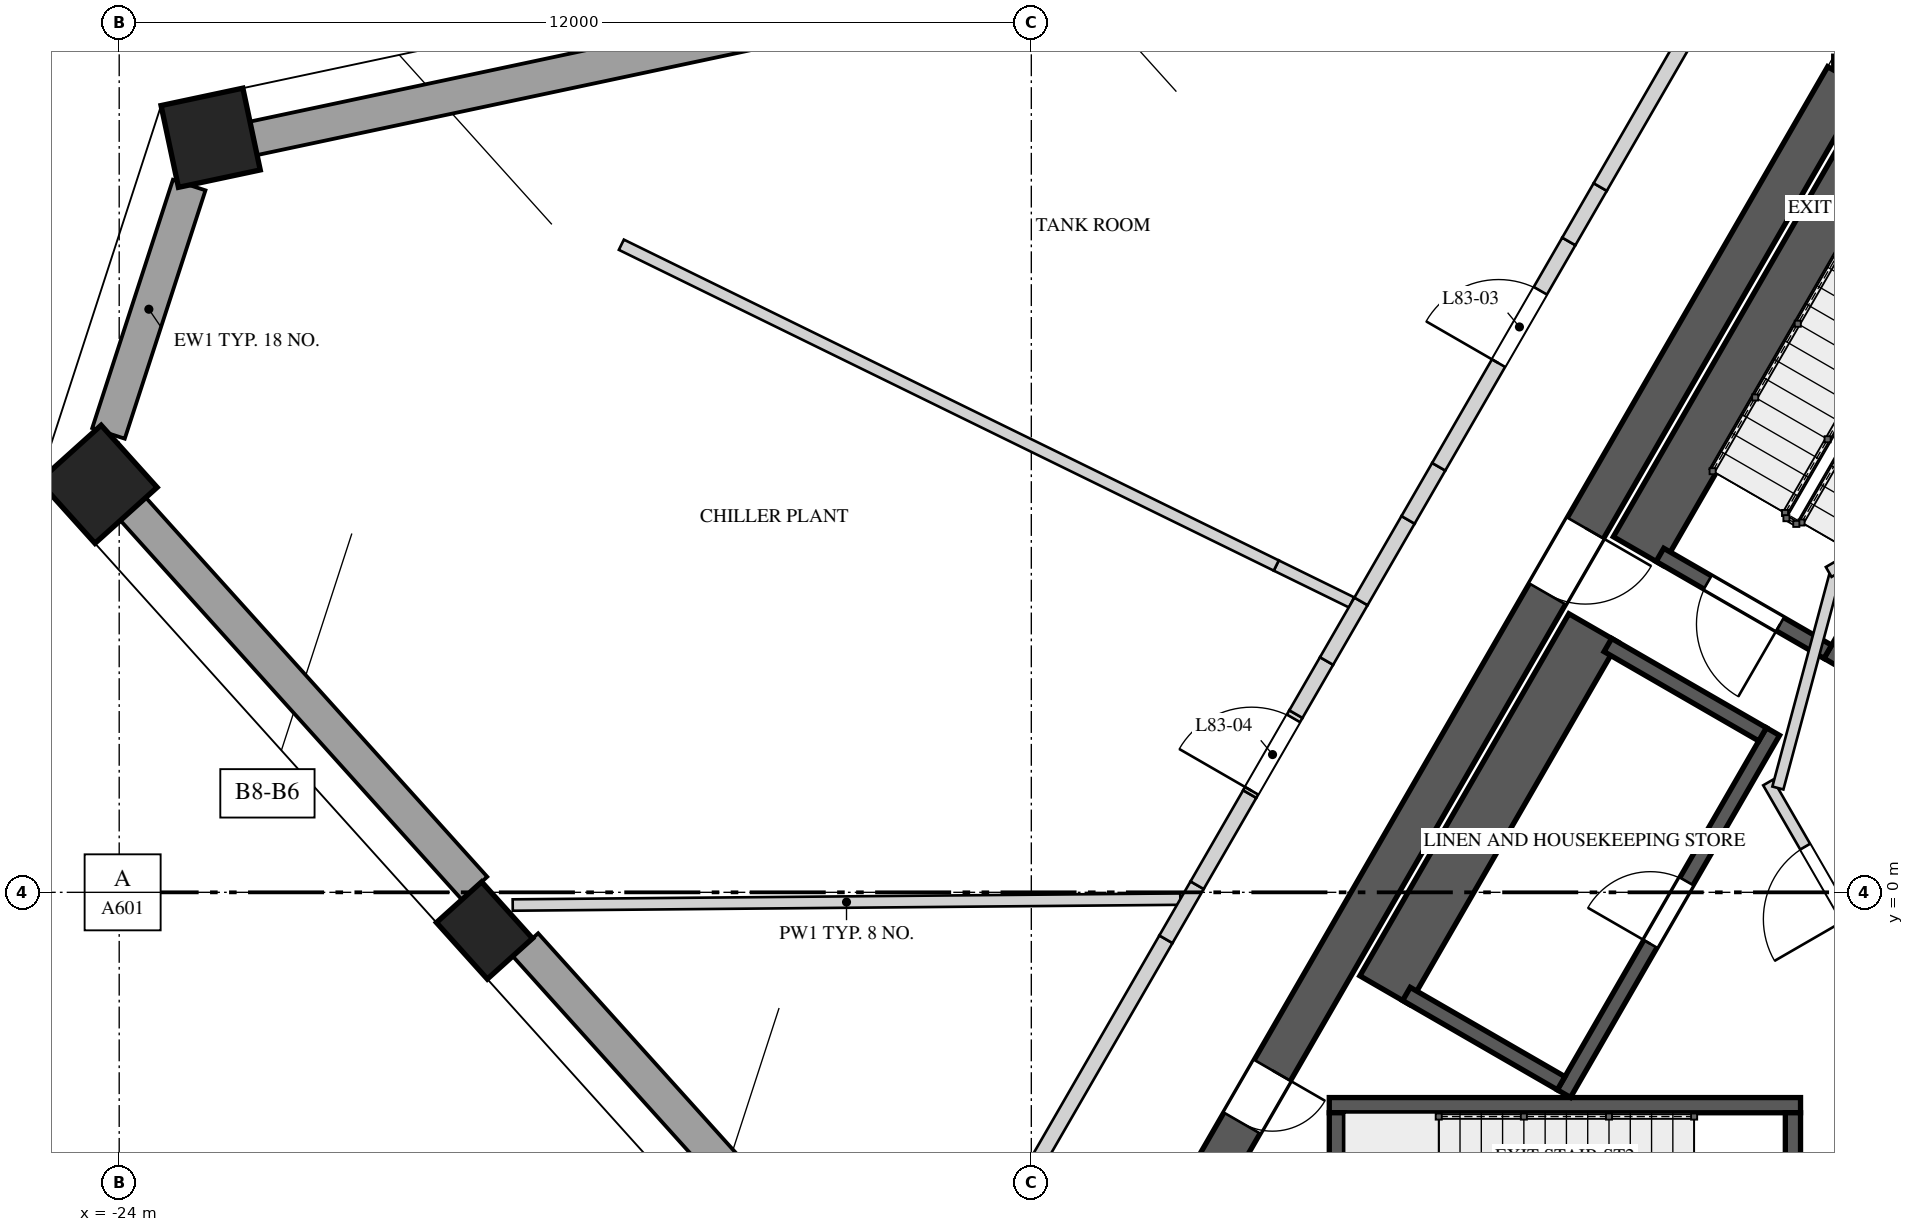
"""IFC4 building model, lengths in metres.
Left out: names, types, materials, properties, quantities, classifications, styles, units other than length and angle.
Written with IfcOpenShell. Run it as: python <this file> out.ifc"""

import sys

from ifc_helpers import new_model, si_unit, direction, frame, frame_2d, origin, origin_2d, place, context, subcontext, project, spatial, polyline, rectangle, outline, extrude, element, fill, save


model = new_model("IFC4")
c1 = context("Model", 3, precision=1e-05, world=origin(), true_north=direction((0.0, 1.0)))
c2 = subcontext(c1, "Body", "Model", "MODEL_VIEW")
j1 = project(units=[si_unit("LENGTHUNIT", "METRE"), si_unit("PLANEANGLEUNIT", "RADIAN")], contexts=[c1])
p1 = place(None, origin())
s1 = spatial("IfcSite", under=j1, at=p1, CompositionType="ELEMENT")
p2 = place(p1, origin())
s2 = spatial("IfcBuilding", under=s1, at=p2, CompositionType="ELEMENT")
p3 = place(p2, frame((0.0, 0.0, 361.4)))
s3 = spatial("IfcBuildingStorey", under=s2, at=p3, CompositionType="ELEMENT", Elevation=361.4)
p4 = place(p3, frame((1.443, 10.725, 0.0), z_axis=(0.0, 0.0, 1.0), x_axis=(-1.0, 0.0, 0.0)))
e1 = element("IfcWall", 1, at=p4, inside=s3, PredefinedType="SHEAR", context=c2, shape_type="SweptSolid", body=[
    extrude(rectangle(XDim=2.887, YDim=0.55, at=frame_2d((1.443, 0.0))), origin(), (0.0, 0.0, 1.0), 4.5),
])
p5 = place(p3, frame((-1.285, 10.725, 0.0), z_axis=(0.0, 0.0, 1.0), x_axis=(-0.499994590896, -0.86602852671, 0.0)))
e2 = element("IfcWall", 2, at=p5, inside=s3, PredefinedType="SHEAR", context=c2, shape_type="SweptSolid", body=[
    extrude(rectangle(XDim=17.292, YDim=0.55, at=frame_2d((8.646, 0.0))), origin(), (0.0, 0.0, 1.0), 4.5),
])
p6 = place(p5, frame((6.851, 0.0, 0.0)))
e3 = element("IfcOpeningElement", 3, at=p6, cuts=e2, PredefinedType="OPENING", context=c2, shape_type="SweptSolid", body=[
    extrude(rectangle(XDim=1.0, YDim=2.4, at=frame_2d((0.5, 1.2))), frame((0.0, 0.285, 0.0), z_axis=(0.0, -1.0, 0.0), x_axis=(1.0, 0.0, 0.0)), (0.0, 0.0, 1.0), 0.57),
])
p7 = place(p5, frame((15.089, 0.0, 0.0)))
e4 = element("IfcOpeningElement", 4, at=p7, cuts=e2, PredefinedType="OPENING", context=c2, shape_type="SweptSolid", body=[
    extrude(rectangle(XDim=0.8, YDim=2.1, at=frame_2d((0.4, 1.05))), frame((0.0, 0.285, 0.0), z_axis=(0.0, -1.0, 0.0), x_axis=(1.0, 0.0, 0.0)), (0.0, 0.0, 1.0), 0.57),
])
p8 = place(p3, frame((-24.278, 5.368, 0.0), z_axis=(0.0, 0.0, 1.0), x_axis=(0.669130606359, -0.743144825477, 0.0)))
e5 = element("IfcColumn", 5, at=p8, inside=s3, PredefinedType="COLUMN", context=c2, shape_type="SweptSolid", body=[
    extrude(rectangle(XDim=1.1, YDim=1.1, at=origin_2d()), origin(), (0.0, 0.0, 1.0), 4.5),
])
p9 = place(p3, frame((-19.195, -0.502, 0.0), z_axis=(0.0, 0.0, 1.0), x_axis=(0.669130606359, -0.743144825477, 0.0)))
e6 = element("IfcColumn", 6, at=p9, inside=s3, PredefinedType="COLUMN", context=c2, shape_type="SweptSolid", body=[
    extrude(rectangle(XDim=1.0, YDim=0.8, at=origin_2d()), origin(), (0.0, 0.0, 1.0), 4.5),
])
p10 = place(p3, frame((-22.797, 9.927, 0.0), z_axis=(0.0, 0.0, 1.0), x_axis=(-0.978147600734, -0.207911690818, 0.0)))
e7 = element("IfcColumn", 7, at=p10, inside=s3, PredefinedType="COLUMN", context=c2, shape_type="SweptSolid", body=[
    extrude(rectangle(XDim=1.1, YDim=1.1, at=origin_2d()), origin(), (0.0, 0.0, 1.0), 4.5),
])
p11 = place(p3, frame((-23.079, 9.305, 0.0), z_axis=(0.0, 0.0, 1.0), x_axis=(-0.309076430482, -0.95103720228, 0.0)))
e8 = element("IfcWall", 8, at=p11, inside=s3, PredefinedType="SOLIDWALL", context=c2, shape_type="SweptSolid", body=[
    extrude(rectangle(XDim=3.435, YDim=0.45, at=frame_2d((1.718, 0.0))), origin(), (0.0, 0.0, 1.0), 3.8),
])
p12 = place(p3, frame((-23.817, 5.043, 0.0), z_axis=(0.0, 0.0, 1.0), x_axis=(0.669137493687, -0.743138624041, 0.0)))
e9 = element("IfcWall", 9, at=p12, inside=s3, PredefinedType="SOLIDWALL", context=c2, shape_type="SweptSolid", body=[
    extrude(rectangle(XDim=6.714, YDim=0.45, at=frame_2d((3.357, 0.0))), origin(), (0.0, 0.0, 1.0), 3.8),
])
p13 = place(p3, frame((-18.656, -0.689, 0.0), z_axis=(0.0, 0.0, 1.0), x_axis=(0.669117789535, -0.743156365598, 0.0)))
e10 = element("IfcWall", 10, at=p13, inside=s3, PredefinedType="SOLIDWALL", context=c2, shape_type="SweptSolid", body=[
    extrude(rectangle(XDim=7.314, YDim=0.45, at=frame_2d((3.657, 0.0))), origin(), (0.0, 0.0, 1.0), 3.8),
])
p14 = place(p3, frame((-15.666, 11.315, 0.0), z_axis=(0.0, 0.0, 1.0), x_axis=(-0.978144338977, -0.207927035587, 0.0)))
e11 = element("IfcWall", 11, at=p14, inside=s3, PredefinedType="SOLIDWALL", context=c2, shape_type="SweptSolid", body=[
    extrude(rectangle(XDim=6.714, YDim=0.45, at=frame_2d((3.357, 0.0))), origin(), (0.0, 0.0, 1.0), 3.8),
])
p15 = place(p3, frame((-0.918, 9.86, 0.0), z_axis=(0.0, 0.0, 1.0), x_axis=(-0.500026960575, -0.86600983753, 0.0)))
e12 = element("IfcWall", 12, at=p15, inside=s3, PredefinedType="SOLIDWALL", context=c2, shape_type="SweptSolid", body=[
    extrude(rectangle(XDim=6.2, YDim=0.75, at=frame_2d((3.1, 0.0))), origin(), (0.0, 0.0, 1.0), 4.15),
])
p16 = place(p3, frame((1.615, 8.397, 0.0), z_axis=(0.0, 0.0, 1.0), x_axis=(-0.500009909098, -0.866019682689, 0.0)))
e13 = element("IfcWall", 13, at=p16, inside=s3, PredefinedType="SOLIDWALL", context=c2, shape_type="SweptSolid", body=[
    extrude(rectangle(XDim=6.2, YDim=0.2, at=frame_2d((3.1, 0.0))), origin(), (0.0, 0.0, 1.0), 4.15),
])
p17 = place(p3, frame((-1.521, 3.165, 0.0), z_axis=(0.0, 0.0, 1.0), x_axis=(-0.866030925526, 0.499990435942, 0.0)))
e14 = element("IfcWall", 14, at=p17, inside=s3, PredefinedType="SOLIDWALL", context=c2, shape_type="SweptSolid", body=[
    extrude(rectangle(XDim=2.55, YDim=0.2, at=frame_2d((1.275, 0.0))), origin(), (0.0, 0.0, 1.0), 4.15),
])
p18 = place(p17, frame((0.725, 0.0, 0.0)))
e15 = element("IfcOpeningElement", 15, at=p18, cuts=e14, PredefinedType="OPENING", context=c2, shape_type="SweptSolid", body=[
    extrude(rectangle(XDim=1.1, YDim=2.4, at=frame_2d((0.55, 1.2))), frame((0.0, 0.11, 0.0), z_axis=(0.0, -1.0, 0.0), x_axis=(1.0, 0.0, 0.0)), (0.0, 0.0, 1.0), 0.22),
])
p19 = place(p3, frame((-8.08, -2.8, 0.0), z_axis=(0.0, 0.0, 1.0), x_axis=(1.0, 0.0, 0.0)))
e16 = element("IfcWall", 16, at=p19, inside=s3, PredefinedType="SOLIDWALL", context=c2, shape_type="SweptSolid", body=[
    extrude(rectangle(XDim=6.2, YDim=0.2, at=frame_2d((3.1, 0.0))), origin(), (0.0, 0.0, 1.0), 4.15),
])
p20 = place(p3, frame((-7.98, -2.9, 0.0), z_axis=(0.0, 0.0, 1.0), x_axis=(0.0, -1.0, 0.0)))
e17 = element("IfcWall", 17, at=p20, inside=s3, PredefinedType="SOLIDWALL", context=c2, shape_type="SweptSolid", body=[
    extrude(rectangle(XDim=2.55, YDim=0.2, at=frame_2d((1.275, 0.0))), origin(), (0.0, 0.0, 1.0), 4.15),
])
p21 = place(p3, frame((-1.98, -2.9, 0.0), z_axis=(0.0, 0.0, 1.0), x_axis=(0.0, -1.0, 0.0)))
e18 = element("IfcWall", 18, at=p21, inside=s3, PredefinedType="SOLIDWALL", context=c2, shape_type="SweptSolid", body=[
    extrude(rectangle(XDim=2.55, YDim=0.2, at=frame_2d((1.275, 0.0))), origin(), (0.0, 0.0, 1.0), 4.15),
])
p22 = place(p21, frame((0.725, 0.0, 0.0)))
e19 = element("IfcOpeningElement", 19, at=p22, cuts=e18, PredefinedType="OPENING", context=c2, shape_type="SweptSolid", body=[
    extrude(rectangle(XDim=1.1, YDim=2.4, at=frame_2d((0.55, 1.2))), frame((0.0, 0.11, 0.0), z_axis=(0.0, -1.0, 0.0), x_axis=(1.0, 0.0, 0.0)), (0.0, 0.0, 1.0), 0.22),
])
p23 = place(p3, frame((-4.993, -2.648, 0.0), z_axis=(0.0, 0.0, 1.0), x_axis=(0.499996545922, 0.866027397988, 0.0)))
e20 = element("IfcWall", 20, at=p23, inside=s3, PredefinedType="SOLIDWALL", context=c2, shape_type="SweptSolid", body=[
    extrude(rectangle(XDim=5.5, YDim=0.2, at=frame_2d((2.75, 0.0))), origin(), (0.0, 0.0, 1.0), 4.15),
])
p24 = place(p23, frame((2.275, 0.0, 0.0)))
e21 = element("IfcOpeningElement", 21, at=p24, cuts=e20, PredefinedType="OPENING", context=c2, shape_type="SweptSolid", body=[
    extrude(rectangle(XDim=0.95, YDim=2.4, at=frame_2d((0.475, 1.2))), frame((0.0, 0.11, 0.0), z_axis=(0.0, -1.0, 0.0), x_axis=(1.0, 0.0, 0.0)), (0.0, 0.0, 1.0), 0.22),
])
p25 = place(p3, frame((-4.603, 3.477, 0.0), z_axis=(0.0, 0.0, 1.0), x_axis=(-0.500015767406, -0.866016300277, 0.0)))
e22 = element("IfcWall", 22, at=p25, inside=s3, PredefinedType="SOLIDWALL", context=c2, shape_type="SweptSolid", body=[
    extrude(rectangle(XDim=5.5, YDim=0.75, at=frame_2d((2.75, 0.0))), origin(), (0.0, 0.0, 1.0), 4.15),
])
p26 = place(p3, frame((-2.38, 2.078, 0.0), z_axis=(0.0, 0.0, 1.0), x_axis=(-0.866061024631, 0.499938297808, 0.0)))
e23 = element("IfcWall", 23, at=p26, inside=s3, PredefinedType="SOLIDWALL", context=c2, shape_type="SweptSolid", body=[
    extrude(rectangle(XDim=2.35, YDim=0.2, at=frame_2d((1.175, 0.0))), origin(), (0.0, 0.0, 1.0), 4.15),
])
p27 = place(p3, frame((-5.03, -2.512, 0.0), z_axis=(0.0, 0.0, 1.0), x_axis=(-0.866016039709, 0.500016218704, 0.0)))
e24 = element("IfcWall", 24, at=p27, inside=s3, PredefinedType="SOLIDWALL", context=c2, shape_type="SweptSolid", body=[
    extrude(rectangle(XDim=2.35, YDim=0.2, at=frame_2d((1.175, 0.0))), origin(), (0.0, 0.0, 1.0), 4.15),
])
p28 = place(p3, frame((-0.744, -1.261, 0.0), z_axis=(0.0, 0.0, 1.0), x_axis=(-0.500004234368, 0.866022959057, 0.0)))
e25 = element("IfcWall", 25, at=p28, inside=s3, PredefinedType="PARTITIONING", context=c2, shape_type="SweptSolid", body=[
    extrude(rectangle(XDim=3.125, YDim=0.15, at=frame_2d((1.562, 0.0))), origin(), (0.0, 0.0, 1.0), 4.15),
])
p29 = place(p28, frame((1.05, 0.0, 0.0)))
e26 = element("IfcOpeningElement", 26, at=p29, cuts=e25, PredefinedType="OPENING", context=c2, shape_type="SweptSolid", body=[
    extrude(rectangle(XDim=1.1, YDim=2.4, at=frame_2d((0.55, 1.2))), frame((0.0, 0.085, 0.0), z_axis=(0.0, -1.0, 0.0), x_axis=(1.0, 0.0, 0.0)), (0.0, 0.0, 1.0), 0.17),
])
p30 = place(p3, frame((-2.178, 1.372, 0.0), z_axis=(0.0, 0.0, 1.0), x_axis=(0.258808958833, 0.96592852884, 0.0)))
e27 = element("IfcWall", 27, at=p30, inside=s3, PredefinedType="PARTITIONING", context=c2, shape_type="SweptSolid", body=[
    extrude(rectangle(XDim=2.903, YDim=0.15, at=frame_2d((1.451, 0.0))), origin(), (0.0, 0.0, 1.0), 4.15),
])
p31 = place(p3, frame((-1.51, 4.215, 0.0), z_axis=(0.0, 0.0, 1.0), x_axis=(0.866085525409, 0.49989585183, 0.0)))
e28 = element("IfcWall", 28, at=p31, inside=s3, PredefinedType="PARTITIONING", context=c2, shape_type="SweptSolid", body=[
    extrude(rectangle(XDim=1.3, YDim=0.15, at=frame_2d((0.65, 0.0))), origin(), (0.0, 0.0, 1.0), 4.15),
])
p32 = place(p3, frame((-10.04, -0.089, 0.0), z_axis=(0.0, 0.0, 1.0), x_axis=(-0.999960441248, -0.00889471414, 0.0)))
e29 = element("IfcWall", 29, at=p32, inside=s3, PredefinedType="PARTITIONING", context=c2, shape_type="SweptSolid", body=[
    extrude(rectangle(XDim=8.783, YDim=0.15, at=frame_2d((4.392, 0.0))), origin(), (0.0, 0.0, 1.0), 3.45),
])
p33 = place(p3, frame((-7.786, 3.814, 0.0), z_axis=(0.0, 0.0, 1.0), x_axis=(-0.898068056395, 0.439856528976, 0.0)))
e30 = element("IfcWall", 30, at=p33, inside=s3, PredefinedType="PARTITIONING", context=c2, shape_type="SweptSolid", body=[
    extrude(rectangle(XDim=1.104, YDim=0.15, at=frame_2d((0.552, 0.0))), origin(), (0.0, 0.0, 1.0), 3.05),
])
p34 = place(p3, frame((-8.778, 4.3, 0.0), z_axis=(0.0, 0.0, 1.0), x_axis=(-0.898056553391, 0.439880014222, 0.0)))
e31 = element("IfcWall", 31, at=p34, inside=s3, PredefinedType="PARTITIONING", context=c2, shape_type="SweptSolid", body=[
    extrude(rectangle(XDim=9.594, YDim=0.15, at=frame_2d((4.797, 0.0))), origin(), (0.0, 0.0, 1.0), 4.15),
])
p35 = place(p3, frame((-12.326, -4.25, 0.0), z_axis=(0.0, 0.0, 1.0), x_axis=(0.499982771656, 0.866035350345, 0.0)))
e32 = element("IfcWall", 32, at=p35, inside=s3, PredefinedType="SOLIDWALL", context=c2, shape_type="SweptSolid", body=[
    extrude(rectangle(XDim=4.195, YDim=0.2, at=frame_2d((2.097, 0.0))), origin(), (0.0, 0.0, 1.0), 4.15),
])
p36 = place(p3, frame((-10.229, -0.617, 0.0), z_axis=(0.0, 0.0, 1.0), x_axis=(0.5001686003, 0.865928040471, 0.0)))
e33 = element("IfcWall", 33, at=p36, inside=s3, PredefinedType="SOLIDWALL", context=c2, shape_type="SweptSolid", body=[
    extrude(rectangle(XDim=0.821, YDim=0.2, at=frame_2d((0.411, 0.0))), origin(), (0.0, 0.0, 1.0), 3.45),
])
p37 = place(p3, frame((-9.819, 0.094, 0.0), z_axis=(0.0, 0.0, 1.0), x_axis=(0.500007335828, 0.866021168401, 0.0)))
e34 = element("IfcWall", 34, at=p37, inside=s3, PredefinedType="SOLIDWALL", context=c2, shape_type="SweptSolid", body=[
    extrude(rectangle(XDim=1.385, YDim=0.2, at=frame_2d((0.692, 0.0))), origin(), (0.0, 0.0, 1.0), 4.15),
])
p38 = place(p3, frame((-9.126, 1.293, 0.0), z_axis=(0.0, 0.0, 1.0), x_axis=(0.499966081581, 0.866044985707, 0.0)))
e35 = element("IfcWall", 35, at=p38, inside=s3, PredefinedType="SOLIDWALL", context=c2, shape_type="SweptSolid", body=[
    extrude(outline(polyline([(0.0, 0.0), (1.214, 0.0), (1.215, 3.05), (0.271, 3.05), (0.271, 4.15), (0.0, 4.15), (0.0, 0.0)])), frame((0.0, 0.1, 0.0), z_axis=(0.0, -1.0, 0.0), x_axis=(1.0, 0.0, 0.0)), (0.0, 0.0, 1.0), 0.2),
])
p39 = place(p38, frame((0.05, 0.0, 0.0)))
e36 = element("IfcOpeningElement", 36, at=p39, cuts=e35, PredefinedType="OPENING", context=c2, shape_type="SweptSolid", body=[
    extrude(rectangle(XDim=1.1, YDim=2.4, at=frame_2d((0.55, 1.2))), frame((0.0, 0.11, 0.0), z_axis=(0.0, -1.0, 0.0), x_axis=(1.0, 0.0, 0.0)), (0.0, 0.0, 1.0), 0.22),
])
p40 = place(p3, frame((-8.519, 2.344, 0.0), z_axis=(0.0, 0.0, 1.0), x_axis=(0.499914554297, 0.866074730264, 0.0)))
e37 = element("IfcWall", 37, at=p40, inside=s3, PredefinedType="SOLIDWALL", context=c2, shape_type="SweptSolid", body=[
    extrude(rectangle(XDim=0.807, YDim=0.2, at=frame_2d((0.403, 0.0))), origin(), (0.0, 0.0, 1.0), 4.15),
])
p41 = place(p3, frame((-8.116, 3.043, 0.0), z_axis=(0.0, 0.0, 1.0), x_axis=(0.499994660107, 0.866028486751, 0.0)))
e38 = element("IfcWall", 38, at=p41, inside=s3, PredefinedType="SOLIDWALL", context=c2, shape_type="SweptSolid", body=[
    extrude(rectangle(XDim=0.906, YDim=0.2, at=frame_2d((0.453, 0.0))), origin(), (0.0, 0.0, 1.0), 3.05),
])
p42 = place(p3, frame((-7.663, 3.828, 0.0), z_axis=(0.0, 0.0, 1.0), x_axis=(0.499955681623, 0.866050989499, 0.0)))
e39 = element("IfcWall", 39, at=p42, inside=s3, PredefinedType="SOLIDWALL", context=c2, shape_type="SweptSolid", body=[
    extrude(rectangle(XDim=1.238, YDim=0.2, at=frame_2d((0.619, 0.0))), origin(), (0.0, 0.0, 1.0), 4.15),
])
p43 = place(p3, frame((-7.044, 4.9, 0.0), z_axis=(0.0, 0.0, 1.0), x_axis=(0.500141487433, 0.865943700565, 0.0)))
e40 = element("IfcWall", 40, at=p43, inside=s3, PredefinedType="SOLIDWALL", context=c2, shape_type="SweptSolid", body=[
    extrude(rectangle(XDim=0.807, YDim=0.2, at=frame_2d((0.403, 0.0))), origin(), (0.0, 0.0, 1.0), 3.25),
])
p44 = place(p3, frame((-6.64, 5.599, 0.0), z_axis=(0.0, 0.0, 1.0), x_axis=(0.499989998285, 0.8660311782, 0.0)))
e41 = element("IfcWall", 41, at=p44, inside=s3, PredefinedType="SOLIDWALL", context=c2, shape_type="SweptSolid", body=[
    extrude(rectangle(XDim=3.423, YDim=0.2, at=frame_2d((1.711, 0.0))), origin(), (0.0, 0.0, 1.0), 4.15),
])
p45 = place(p44, frame((1.574, 0.0, 0.0)))
e42 = element("IfcOpeningElement", 42, at=p45, cuts=e41, PredefinedType="OPENING", context=c2, shape_type="SweptSolid", body=[
    extrude(rectangle(XDim=1.1, YDim=2.4, at=frame_2d((0.55, 1.2))), frame((0.0, 0.11, 0.0), z_axis=(0.0, -1.0, 0.0), x_axis=(1.0, 0.0, 0.0)), (0.0, 0.0, 1.0), 0.22),
])
p46 = place(p3, frame((-4.929, 8.563, 0.0), z_axis=(0.0, 0.0, 1.0), x_axis=(0.500046299512, 0.865998671098, 0.0)))
e43 = element("IfcWall", 43, at=p46, inside=s3, PredefinedType="SOLIDWALL", context=c2, shape_type="SweptSolid", body=[
    extrude(rectangle(XDim=0.827, YDim=0.2, at=frame_2d((0.413, 0.0))), origin(), (0.0, 0.0, 1.0), 3.45),
])
p47 = place(p3, frame((-4.515, 9.279, 0.0), z_axis=(0.0, 0.0, 1.0), x_axis=(0.499975428181, 0.866039589866, 0.0)))
e44 = element("IfcWall", 44, at=p47, inside=s3, PredefinedType="SOLIDWALL", context=c2, shape_type="SweptSolid", body=[
    extrude(rectangle(XDim=4.066, YDim=0.2, at=frame_2d((2.033, 0.0))), origin(), (0.0, 0.0, 1.0), 4.15),
])
p48 = place(p18, origin())
e45 = element("IfcDoor", 45, at=p48, inside=s3, OperationType="SINGLE_SWING_RIGHT", PredefinedType="DOOR", context=c2, shape_type="SweptSolid", body=[
    extrude(rectangle(XDim=1.1, YDim=2.4, at=frame_2d((0.55, 1.2))), frame((0.0, 0.025, 0.0), z_axis=(0.0, -1.0, 0.0), x_axis=(1.0, 0.0, 0.0)), (0.0, 0.0, 1.0), 0.05),
])
fill(e15, e45)
p49 = place(p24, origin())
e46 = element("IfcDoor", 46, at=p49, inside=s3, OperationType="SINGLE_SWING_LEFT", PredefinedType="DOOR", context=c2, shape_type="SweptSolid", body=[
    extrude(rectangle(XDim=0.95, YDim=2.4, at=frame_2d((0.475, 1.2))), frame((0.0, 0.025, 0.0), z_axis=(0.0, -1.0, 0.0), x_axis=(1.0, 0.0, 0.0)), (0.0, 0.0, 1.0), 0.05),
])
fill(e21, e46)
p50 = place(p29, origin())
e47 = element("IfcDoor", 47, at=p50, inside=s3, OperationType="SINGLE_SWING_LEFT", PredefinedType="DOOR", context=c2, shape_type="SweptSolid", body=[
    extrude(rectangle(XDim=1.1, YDim=2.4, at=frame_2d((0.55, 1.2))), frame((0.0, 0.025, 0.0), z_axis=(0.0, -1.0, 0.0), x_axis=(1.0, 0.0, 0.0)), (0.0, 0.0, 1.0), 0.05),
])
fill(e26, e47)
p51 = place(p6, origin())
e48 = element("IfcDoor", 48, at=p51, inside=s3, OperationType="SINGLE_SWING_RIGHT", PredefinedType="DOOR", context=c2, shape_type="SweptSolid", body=[
    extrude(rectangle(XDim=1.0, YDim=2.4, at=frame_2d((0.5, 1.2))), frame((0.0, 0.025, 0.0), z_axis=(0.0, -1.0, 0.0), x_axis=(1.0, 0.0, 0.0)), (0.0, 0.0, 1.0), 0.05),
])
fill(e3, e48)
p52 = place(p7, origin())
e49 = element("IfcDoor", 49, at=p52, inside=s3, OperationType="SINGLE_SWING_LEFT", PredefinedType="DOOR", context=c2, shape_type="SweptSolid", body=[
    extrude(rectangle(XDim=0.8, YDim=2.1, at=frame_2d((0.4, 1.05))), frame((0.0, 0.025, 0.0), z_axis=(0.0, -1.0, 0.0), x_axis=(1.0, 0.0, 0.0)), (0.0, 0.0, 1.0), 0.05),
])
fill(e4, e49)
p53 = place(p45, origin())
e50 = element("IfcDoor", 50, at=p53, inside=s3, OperationType="SINGLE_SWING_RIGHT", PredefinedType="DOOR", context=c2, shape_type="SweptSolid", body=[
    extrude(rectangle(XDim=1.1, YDim=2.4, at=frame_2d((0.55, 1.2))), frame((0.0, 0.025, 0.0), z_axis=(0.0, -1.0, 0.0), x_axis=(1.0, 0.0, 0.0)), (0.0, 0.0, 1.0), 0.05),
])
fill(e42, e50)
p54 = place(p39, origin())
e51 = element("IfcDoor", 51, at=p54, inside=s3, OperationType="SINGLE_SWING_LEFT", PredefinedType="DOOR", context=c2, shape_type="SweptSolid", body=[
    extrude(rectangle(XDim=1.1, YDim=2.4, at=frame_2d((0.55, 1.2))), frame((0.0, 0.025, 0.0), z_axis=(0.0, -1.0, 0.0), x_axis=(1.0, 0.0, 0.0)), (0.0, 0.0, 1.0), 0.05),
])
fill(e36, e51)
save(model, sys.argv[1])
